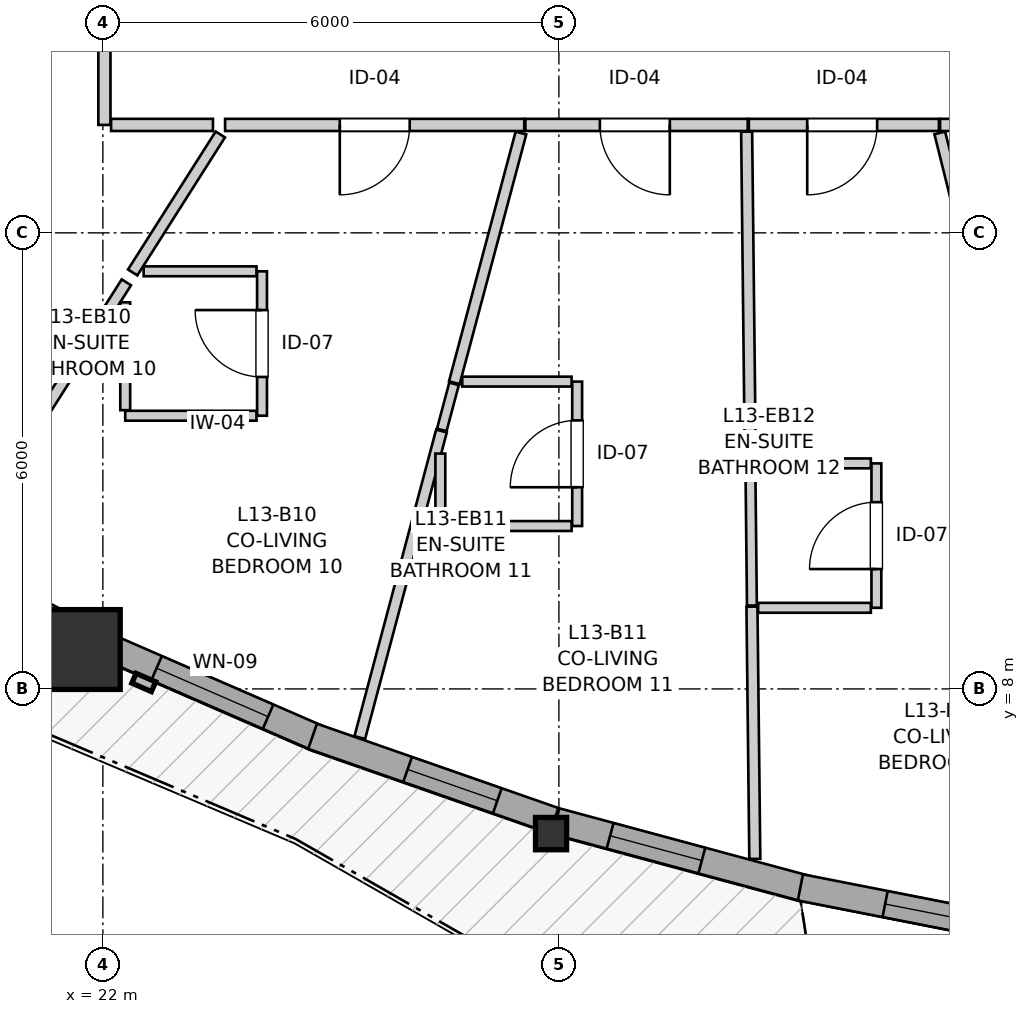
"""IFC4 building model, lengths in metres.
Left out: names, types, materials, properties, quantities, classifications, styles, units other than length and angle.
Written with IfcOpenShell. Run it as: python <this file> out.ifc"""

import sys

from ifc_helpers import new_model, si_unit, direction, frame, frame_2d, origin, origin_2d, place, context, subcontext, project, spatial, rectangle, i_section, extrude, source, transform, mapped, element, fill, save


model = new_model("IFC4")
c1 = context("Model", 3, precision=1e-05, world=origin(), true_north=direction((0.0, 1.0)))
c2 = subcontext(c1, "Body", "Model", "MODEL_VIEW")
j1 = project(units=[si_unit("LENGTHUNIT", "METRE"), si_unit("PLANEANGLEUNIT", "RADIAN")], contexts=[c1])
p1 = place(None, origin())
s1 = spatial("IfcSite", under=j1, at=p1, CompositionType="ELEMENT")
p2 = place(p1, origin())
s2 = spatial("IfcBuilding", under=s1, at=p2, CompositionType="ELEMENT")
p3 = place(p2, frame((0.0, 0.0, 46.2)))
s3 = spatial("IfcBuildingStorey", under=s2, at=p3, CompositionType="ELEMENT", Elevation=46.2)
m1 = source(origin(), c2, "Body", "SweptSolid", [
    extrude(rectangle(XDim=1.05, YDim=1.05, at=origin_2d()), origin(), (0.0, 0.0, 1.0), 2.94),
])
p4 = place(p3, frame((21.703, 8.518, 0.0), z_axis=(0.0, 0.0, 1.0), x_axis=(1.0, 0.0, 0.0)))
e1 = element("IfcColumn", 1, at=p4, inside=s3, PredefinedType="COLUMN", context=c2, shape_type="MappedRepresentation", body=[
    mapped(m1, transform((0.0, 0.0, 0.0), x_axis=(1.0, 0.0, 0.0), y_axis=(0.0, 1.0, 0.0), z_axis=(0.0, 0.0, 1.0), scale=1.0)),
])
m2 = source(origin(), c2, "Body", "SweptSolid", [
    extrude(i_section(OverallWidth=0.409, OverallDepth=0.425, WebThickness=0.03, FlangeThickness=0.048, FilletRadius=0.015, at=origin_2d()), origin(), (0.0, 0.0, 1.0), 2.94),
])
p5 = place(p3, frame((27.896, 6.096, 0.0), z_axis=(0.0, 0.0, 1.0), x_axis=(1.0, 0.0, 0.0)))
e2 = element("IfcColumn", 2, at=p5, inside=s3, PredefinedType="PILASTER", context=c2, shape_type="MappedRepresentation", body=[
    mapped(m2, transform((0.0, 0.0, 0.0), x_axis=(1.0, 0.0, 0.0), y_axis=(0.0, 1.0, 0.0), z_axis=(0.0, 0.0, 1.0), scale=1.0)),
])
p6 = place(p3, frame((18.842, 10.226, 0.0), z_axis=(0.0, 0.0, 1.0), x_axis=(0.884373657766, -0.466779641211, 0.0)))
e3 = element("IfcWall", 3, at=p6, inside=s3, PredefinedType="SOLIDWALL", context=c2, shape_type="SweptSolid", body=[
    extrude(rectangle(XDim=3.028, YDim=0.35, at=frame_2d((1.514, 0.0))), origin(), (0.0, 0.0, 1.0), 2.42),
])
p7 = place(p6, frame((0.384, 0.0, 0.82)))
e4 = element("IfcOpeningElement", 4, at=p7, cuts=e3, PredefinedType="OPENING", context=c2, shape_type="SweptSolid", body=[
    extrude(rectangle(XDim=0.58, YDim=1.35, at=frame_2d((0.29, 0.675))), frame((0.0, 0.185, 0.0), z_axis=(0.0, -1.0, 0.0), x_axis=(1.0, 0.0, 0.0)), (0.0, 0.0, 1.0), 0.37),
])
p8 = place(p6, frame((1.288, 0.0, 0.82)))
e5 = element("IfcOpeningElement", 5, at=p8, cuts=e3, PredefinedType="OPENING", context=c2, shape_type="SweptSolid", body=[
    extrude(rectangle(XDim=1.25, YDim=1.35, at=frame_2d((0.625, 0.675))), frame((0.0, 0.185, 0.0), z_axis=(0.0, -1.0, 0.0), x_axis=(1.0, 0.0, 0.0)), (0.0, 0.0, 1.0), 0.37),
])
p9 = place(p3, frame((22.048, 8.559, 0.0), z_axis=(0.0, 0.0, 1.0), x_axis=(0.9170891658, -0.398682156576, 0.0)))
e6 = element("IfcWall", 6, at=p9, inside=s3, PredefinedType="SOLIDWALL", context=c2, shape_type="SweptSolid", body=[
    extrude(rectangle(XDim=3.047, YDim=0.35, at=frame_2d((1.523, 0.0))), origin(), (0.0, 0.0, 1.0), 2.42),
])
p10 = place(p9, frame((0.719, 0.0, 0.82)))
e7 = element("IfcOpeningElement", 7, at=p10, cuts=e6, PredefinedType="OPENING", context=c2, shape_type="SweptSolid", body=[
    extrude(rectangle(XDim=1.6, YDim=1.35, at=frame_2d((0.8, 0.675))), frame((0.0, 0.185, 0.0), z_axis=(0.0, -1.0, 0.0), x_axis=(1.0, 0.0, 0.0)), (0.0, 0.0, 1.0), 0.37),
])
p11 = place(p3, frame((24.759, 7.377, 0.0), z_axis=(0.0, 0.0, 1.0), x_axis=(0.94414085716, -0.329542170051, 0.0)))
e8 = element("IfcWall", 8, at=p11, inside=s3, PredefinedType="SOLIDWALL", context=c2, shape_type="SweptSolid", body=[
    extrude(rectangle(XDim=3.364, YDim=0.35, at=frame_2d((1.682, 0.0))), origin(), (0.0, 0.0, 1.0), 2.42),
])
p12 = place(p11, frame((1.324, 0.0, 0.82)))
e9 = element("IfcOpeningElement", 9, at=p12, cuts=e8, PredefinedType="OPENING", context=c2, shape_type="SweptSolid", body=[
    extrude(rectangle(XDim=1.25, YDim=1.35, at=frame_2d((0.625, 0.675))), frame((0.0, 0.185, 0.0), z_axis=(0.0, -1.0, 0.0), x_axis=(1.0, 0.0, 0.0)), (0.0, 0.0, 1.0), 0.37),
])
p13 = place(p3, frame((27.961, 6.26, 0.0), z_axis=(0.0, 0.0, 1.0), x_axis=(0.96545566601, -0.260567375106, 0.0)))
e10 = element("IfcWall", 10, at=p13, inside=s3, PredefinedType="SOLIDWALL", context=c2, shape_type="SweptSolid", body=[
    extrude(rectangle(XDim=3.42, YDim=0.35, at=frame_2d((1.71, 0.0))), origin(), (0.0, 0.0, 1.0), 2.42),
])
p14 = place(p13, frame((0.738, 0.0, 0.82)))
e11 = element("IfcOpeningElement", 11, at=p14, cuts=e10, PredefinedType="OPENING", context=c2, shape_type="SweptSolid", body=[
    extrude(rectangle(XDim=1.25, YDim=1.35, at=frame_2d((0.625, 0.675))), frame((0.0, 0.185, 0.0), z_axis=(0.0, -1.0, 0.0), x_axis=(1.0, 0.0, 0.0)), (0.0, 0.0, 1.0), 0.37),
])
p15 = place(p3, frame((31.177, 5.389, 0.0), z_axis=(0.0, 0.0, 1.0), x_axis=(0.981235727687, -0.192811946491, 0.0)))
e12 = element("IfcWall", 12, at=p15, inside=s3, PredefinedType="SOLIDWALL", context=c2, shape_type="SweptSolid", body=[
    extrude(rectangle(XDim=3.212, YDim=0.35, at=frame_2d((1.606, 0.0))), origin(), (0.0, 0.0, 1.0), 2.42),
])
p16 = place(p15, frame((1.136, 0.0, 0.82)))
e13 = element("IfcOpeningElement", 13, at=p16, cuts=e12, PredefinedType="OPENING", context=c2, shape_type="SweptSolid", body=[
    extrude(rectangle(XDim=0.95, YDim=1.35, at=frame_2d((0.475, 0.675))), frame((0.0, 0.185, 0.0), z_axis=(0.0, -1.0, 0.0), x_axis=(1.0, 0.0, 0.0)), (0.0, 0.0, 1.0), 0.37),
])
p17 = place(p3, frame((22.02, 15.42, 0.0), z_axis=(0.0, 0.0, 1.0), x_axis=(0.0, 1.0, 0.0)))
e14 = element("IfcWall", 14, at=p17, inside=s3, PredefinedType="PARTITIONING", context=c2, shape_type="SweptSolid", body=[
    extrude(rectangle(XDim=5.786, YDim=0.16, at=frame_2d((2.893, 0.0))), origin(), (0.0, 0.0, 1.0), 2.94),
])
p18 = place(p17, frame((2.405, 0.0, 0.0)))
e15 = element("IfcOpeningElement", 15, at=p18, cuts=e14, PredefinedType="OPENING", context=c2, shape_type="SweptSolid", body=[
    extrude(rectangle(XDim=0.96, YDim=2.1, at=frame_2d((0.48, 1.05))), frame((0.0, 0.09, 0.0), z_axis=(0.0, -1.0, 0.0), x_axis=(1.0, 0.0, 0.0)), (0.0, 0.0, 1.0), 0.18),
])
p19 = place(p3, frame((27.544, 15.42, 0.0), z_axis=(0.0, 0.0, 1.0), x_axis=(-1.0, 0.0, 0.0)))
e16 = element("IfcWall", 16, at=p19, inside=s3, PredefinedType="PARTITIONING", context=c2, shape_type="SweptSolid", body=[
    extrude(rectangle(XDim=3.936, YDim=0.16, at=frame_2d((1.968, 0.0))), origin(), (0.0, 0.0, 1.0), 2.94),
])
p20 = place(p19, frame((1.507, 0.0, 0.0)))
e17 = element("IfcOpeningElement", 17, at=p20, cuts=e16, PredefinedType="OPENING", context=c2, shape_type="SweptSolid", body=[
    extrude(rectangle(XDim=0.92, YDim=2.1, at=frame_2d((0.46, 1.05))), frame((0.0, 0.09, 0.0), z_axis=(0.0, -1.0, 0.0), x_axis=(1.0, 0.0, 0.0)), (0.0, 0.0, 1.0), 0.18),
])
p21 = place(p3, frame((30.484, 15.42, 0.0), z_axis=(0.0, 0.0, 1.0), x_axis=(-1.0, 0.0, 0.0)))
e18 = element("IfcWall", 18, at=p21, inside=s3, PredefinedType="PARTITIONING", context=c2, shape_type="SweptSolid", body=[
    extrude(rectangle(XDim=2.925, YDim=0.16, at=frame_2d((1.462, 0.0))), origin(), (0.0, 0.0, 1.0), 2.94),
])
p22 = place(p21, frame((1.025, 0.0, 0.0)))
e19 = element("IfcOpeningElement", 19, at=p22, cuts=e18, PredefinedType="OPENING", context=c2, shape_type="SweptSolid", body=[
    extrude(rectangle(XDim=0.92, YDim=2.1, at=frame_2d((0.46, 1.05))), frame((0.0, 0.09, 0.0), z_axis=(0.0, -1.0, 0.0), x_axis=(1.0, 0.0, 0.0)), (0.0, 0.0, 1.0), 0.18),
])
p23 = place(p3, frame((33.0, 15.42, 0.0), z_axis=(0.0, 0.0, 1.0), x_axis=(-1.0, 0.0, 0.0)))
e20 = element("IfcWall", 20, at=p23, inside=s3, PredefinedType="PARTITIONING", context=c2, shape_type="SweptSolid", body=[
    extrude(rectangle(XDim=2.501, YDim=0.16, at=frame_2d((1.25, 0.0))), origin(), (0.0, 0.0, 1.0), 2.94),
])
p24 = place(p23, frame((0.813, 0.0, 0.0)))
e21 = element("IfcOpeningElement", 21, at=p24, cuts=e20, PredefinedType="OPENING", context=c2, shape_type="SweptSolid", body=[
    extrude(rectangle(XDim=0.92, YDim=2.1, at=frame_2d((0.46, 1.05))), frame((0.0, 0.09, 0.0), z_axis=(0.0, -1.0, 0.0), x_axis=(1.0, 0.0, 0.0)), (0.0, 0.0, 1.0), 0.18),
])
p25 = place(p3, frame((24.094, 11.594, 0.0), z_axis=(0.0, 0.0, 1.0), x_axis=(0.0, 1.0, 0.0)))
e22 = element("IfcWall", 22, at=p25, inside=s3, PredefinedType="PARTITIONING", context=c2, shape_type="SweptSolid", body=[
    extrude(rectangle(XDim=1.9, YDim=0.13, at=frame_2d((0.95, 0.0))), origin(), (0.0, 0.0, 1.0), 2.94),
])
p26 = place(p25, frame((0.51, 0.0, 0.0)))
e23 = element("IfcOpeningElement", 23, at=p26, cuts=e22, PredefinedType="OPENING", context=c2, shape_type="SweptSolid", body=[
    extrude(rectangle(XDim=0.88, YDim=2.05, at=frame_2d((0.44, 1.025))), frame((0.0, 0.075, 0.0), z_axis=(0.0, -1.0, 0.0), x_axis=(1.0, 0.0, 0.0)), (0.0, 0.0, 1.0), 0.15),
])
p27 = place(p3, frame((32.177, 9.067, 0.0), z_axis=(0.0, 0.0, 1.0), x_axis=(0.0, 1.0, 0.0)))
e24 = element("IfcWall", 24, at=p27, inside=s3, PredefinedType="PARTITIONING", context=c2, shape_type="SweptSolid", body=[
    extrude(rectangle(XDim=1.9, YDim=0.13, at=frame_2d((0.95, 0.0))), origin(), (0.0, 0.0, 1.0), 2.94),
])
p28 = place(p27, frame((0.51, 0.0, 0.0)))
e25 = element("IfcOpeningElement", 25, at=p28, cuts=e24, PredefinedType="OPENING", context=c2, shape_type="SweptSolid", body=[
    extrude(rectangle(XDim=0.88, YDim=2.05, at=frame_2d((0.44, 1.025))), frame((0.0, 0.075, 0.0), z_axis=(0.0, -1.0, 0.0), x_axis=(1.0, 0.0, 0.0)), (0.0, 0.0, 1.0), 0.15),
])
p29 = place(p3, frame((28.24, 10.143, 0.0), z_axis=(0.0, 0.0, 1.0), x_axis=(0.0, 1.0, 0.0)))
e26 = element("IfcWall", 26, at=p29, inside=s3, PredefinedType="PARTITIONING", context=c2, shape_type="SweptSolid", body=[
    extrude(rectangle(XDim=1.9, YDim=0.13, at=frame_2d((0.95, 0.0))), origin(), (0.0, 0.0, 1.0), 2.94),
])
p30 = place(p29, frame((0.51, 0.0, 0.0)))
e27 = element("IfcOpeningElement", 27, at=p30, cuts=e26, PredefinedType="OPENING", context=c2, shape_type="SweptSolid", body=[
    extrude(rectangle(XDim=0.88, YDim=2.05, at=frame_2d((0.44, 1.025))), frame((0.0, 0.075, 0.0), z_axis=(0.0, -1.0, 0.0), x_axis=(1.0, 0.0, 0.0)), (0.0, 0.0, 1.0), 0.15),
])
p31 = place(p3, frame((34.591, 15.42, 0.0), z_axis=(0.0, 0.0, 1.0), x_axis=(-1.0, 0.0, 0.0)))
e28 = element("IfcWall", 28, at=p31, inside=s3, PredefinedType="PARTITIONING", context=c2, shape_type="SweptSolid", body=[
    extrude(rectangle(XDim=1.576, YDim=0.16, at=frame_2d((0.788, 0.0))), origin(), (0.0, 0.0, 1.0), 2.94),
])
p32 = place(p31, frame((0.327, 0.0, 0.0)))
e29 = element("IfcOpeningElement", 29, at=p32, cuts=e28, PredefinedType="OPENING", context=c2, shape_type="SweptSolid", body=[
    extrude(rectangle(XDim=0.92, YDim=2.1, at=frame_2d((0.46, 1.05))), frame((0.0, 0.09, 0.0), z_axis=(0.0, -1.0, 0.0), x_axis=(1.0, 0.0, 0.0)), (0.0, 0.0, 1.0), 0.18),
])
p33 = place(p3, frame((12.009, 15.406, 0.0), z_axis=(0.0, 0.0, 1.0), x_axis=(0.865925986209, 0.500172156771, 0.0)))
e30 = element("IfcWall", 30, at=p33, inside=s3, PredefinedType="PARTITIONING", context=c2, shape_type="SweptSolid", body=[
    extrude(rectangle(XDim=11.419, YDim=0.145, at=frame_2d((5.709, 0.0))), origin(), (0.0, 0.0, 1.0), 2.94),
])
p34 = place(p3, frame((33.011, 15.315, 0.0), z_axis=(0.0, 0.0, 1.0), x_axis=(0.241616400535, -0.970371843673, 0.0)))
e31 = element("IfcWall", 31, at=p34, inside=s3, PredefinedType="PARTITIONING", context=c2, shape_type="SweptSolid", body=[
    extrude(rectangle(XDim=11.125, YDim=0.145, at=frame_2d((5.562, 0.0))), origin(), (0.0, 0.0, 1.0), 2.94),
])
p35 = place(p3, frame((30.47, 15.331, 0.0), z_axis=(0.0, 0.0, 1.0), x_axis=(0.011204559183, -0.999937226957, 0.0)))
e32 = element("IfcWall", 32, at=p35, inside=s3, PredefinedType="PARTITIONING", context=c2, shape_type="SweptSolid", body=[
    extrude(rectangle(XDim=4.38, YDim=0.145, at=frame_2d((2.19, 0.0))), origin(), (0.0, 0.0, 1.0), 2.94),
])
p36 = place(p3, frame((20.054, 9.8, 0.0), z_axis=(0.0, 0.0, 1.0), x_axis=(0.536345686693, 0.843998403059, 0.0)))
e33 = element("IfcWall", 33, at=p36, inside=s3, PredefinedType="PARTITIONING", context=c2, shape_type="SweptSolid", body=[
    extrude(rectangle(XDim=4.205, YDim=0.145, at=frame_2d((2.103, 0.0))), origin(), (0.0, 0.0, 1.0), 2.94),
])
p37 = place(p3, frame((25.38, 7.36, 0.0), z_axis=(0.0, 0.0, 1.0), x_axis=(0.257575283531, 0.966258233245, 0.0)))
e34 = element("IfcWall", 34, at=p37, inside=s3, PredefinedType="PARTITIONING", context=c2, shape_type="SweptSolid", body=[
    extrude(rectangle(XDim=4.174, YDim=0.145, at=frame_2d((2.087, 0.0))), origin(), (0.0, 0.0, 1.0), 2.94),
])
p38 = place(p3, frame((26.624, 12.028, 0.0), z_axis=(0.0, 0.0, 1.0), x_axis=(0.257743083598, 0.966213487205, 0.0)))
e35 = element("IfcWall", 35, at=p38, inside=s3, PredefinedType="PARTITIONING", context=c2, shape_type="SweptSolid", body=[
    extrude(rectangle(XDim=3.401, YDim=0.145, at=frame_2d((1.7, 0.0))), origin(), (0.0, 0.0, 1.0), 2.94),
])
p39 = place(p3, frame((30.54, 9.082, 0.0), z_axis=(0.0, 0.0, 1.0), x_axis=(0.011329467055, -0.999935819529, 0.0)))
e36 = element("IfcWall", 36, at=p39, inside=s3, PredefinedType="PARTITIONING", context=c2, shape_type="SweptSolid", body=[
    extrude(rectangle(XDim=3.319, YDim=0.145, at=frame_2d((1.659, 0.0))), origin(), (0.0, 0.0, 1.0), 2.94),
])
p40 = place(p3, frame((22.392, 13.479, 0.0), z_axis=(0.0, 0.0, 1.0), x_axis=(0.53614810629, 0.844123929362, 0.0)))
e37 = element("IfcWall", 37, at=p40, inside=s3, PredefinedType="PARTITIONING", context=c2, shape_type="SweptSolid", body=[
    extrude(rectangle(XDim=2.151, YDim=0.145, at=frame_2d((1.075, 0.0))), origin(), (0.0, 0.0, 1.0), 2.94),
])
p41 = place(p3, frame((30.52, 10.937, 0.0), z_axis=(0.0, 0.0, 1.0), x_axis=(0.010879016503, -0.999940821749, 0.0)))
e38 = element("IfcWall", 38, at=p41, inside=s3, PredefinedType="PARTITIONING", context=c2, shape_type="SweptSolid", body=[
    extrude(rectangle(XDim=1.84, YDim=0.13, at=frame_2d((0.92, 0.0))), origin(), (0.0, 0.0, 1.0), 2.94),
])
p42 = place(p3, frame((22.294, 11.594, 0.0), z_axis=(0.0, 0.0, 1.0), x_axis=(1.0, 0.0, 0.0)))
e39 = element("IfcWall", 39, at=p42, inside=s3, PredefinedType="PARTITIONING", context=c2, shape_type="SweptSolid", body=[
    extrude(rectangle(XDim=1.727, YDim=0.13, at=frame_2d((0.864, 0.0))), origin(), (0.0, 0.0, 1.0), 2.94),
])
p43 = place(p3, frame((26.44, 10.143, 0.0), z_axis=(0.0, 0.0, 1.0), x_axis=(1.0, 0.0, 0.0)))
e40 = element("IfcWall", 40, at=p43, inside=s3, PredefinedType="PARTITIONING", context=c2, shape_type="SweptSolid", body=[
    extrude(rectangle(XDim=1.727, YDim=0.13, at=frame_2d((0.864, 0.0))), origin(), (0.0, 0.0, 1.0), 2.508),
])
p44 = place(p3, frame((22.294, 11.667, 0.0), z_axis=(0.0, 0.0, 1.0), x_axis=(0.0, 1.0, 0.0)))
e41 = element("IfcWall", 41, at=p44, inside=s3, PredefinedType="PARTITIONING", context=c2, shape_type="SweptSolid", body=[
    extrude(rectangle(XDim=1.419, YDim=0.13, at=frame_2d((0.709, 0.0))), origin(), (0.0, 0.0, 1.0), 2.94),
])
p45 = place(p3, frame((22.536, 13.494, 0.0), z_axis=(0.0, 0.0, 1.0), x_axis=(1.0, 0.0, 0.0)))
e42 = element("IfcWall", 42, at=p45, inside=s3, PredefinedType="PARTITIONING", context=c2, shape_type="SweptSolid", body=[
    extrude(rectangle(XDim=1.485, YDim=0.13, at=frame_2d((0.742, 0.0))), origin(), (0.0, 0.0, 1.0), 2.94),
])
p46 = place(p3, frame((30.6, 10.967, 0.0), z_axis=(0.0, 0.0, 1.0), x_axis=(1.0, 0.0, 0.0)))
e43 = element("IfcWall", 43, at=p46, inside=s3, PredefinedType="PARTITIONING", context=c2, shape_type="SweptSolid", body=[
    extrude(rectangle(XDim=1.504, YDim=0.13, at=frame_2d((0.752, 0.0))), origin(), (0.0, 0.0, 1.0), 2.94),
])
p47 = place(p3, frame((30.621, 9.067, 0.0), z_axis=(0.0, 0.0, 1.0), x_axis=(1.0, 0.0, 0.0)))
e44 = element("IfcWall", 44, at=p47, inside=s3, PredefinedType="PARTITIONING", context=c2, shape_type="SweptSolid", body=[
    extrude(rectangle(XDim=1.483, YDim=0.13, at=frame_2d((0.741, 0.0))), origin(), (0.0, 0.0, 1.0), 2.508),
])
p48 = place(p3, frame((26.729, 12.043, 0.0), z_axis=(0.0, 0.0, 1.0), x_axis=(1.0, 0.0, 0.0)))
e45 = element("IfcWall", 45, at=p48, inside=s3, PredefinedType="PARTITIONING", context=c2, shape_type="SweptSolid", body=[
    extrude(rectangle(XDim=1.438, YDim=0.13, at=frame_2d((0.719, 0.0))), origin(), (0.0, 0.0, 1.0), 2.94),
])
p49 = place(p3, frame((22.108, 15.42, 0.0), z_axis=(0.0, 0.0, 1.0), x_axis=(1.0, 0.0, 0.0)))
e46 = element("IfcWall", 46, at=p49, inside=s3, PredefinedType="PARTITIONING", context=c2, shape_type="SweptSolid", body=[
    extrude(rectangle(XDim=1.34, YDim=0.16, at=frame_2d((0.67, 0.0))), origin(), (0.0, 0.0, 1.0), 2.94),
])
p50 = place(p3, frame((26.44, 10.216, 0.0), z_axis=(0.0, 0.0, 1.0), x_axis=(0.0, 1.0, 0.0)))
e47 = element("IfcWall", 47, at=p50, inside=s3, PredefinedType="PARTITIONING", context=c2, shape_type="SweptSolid", body=[
    extrude(rectangle(XDim=0.88, YDim=0.13, at=frame_2d((0.44, 0.0))), origin(), (0.0, 0.0, 1.0), 2.94),
])
p51 = place(p3, frame((26.459, 11.407, 0.0), z_axis=(0.0, 0.0, 1.0), x_axis=(0.256984017378, 0.966415653232, 0.0)))
e48 = element("IfcWall", 48, at=p51, inside=s3, PredefinedType="PARTITIONING", context=c2, shape_type="SweptSolid", body=[
    extrude(rectangle(XDim=0.627, YDim=0.13, at=frame_2d((0.313, 0.0))), origin(), (0.0, 0.0, 1.0), 2.94),
])
m3 = source(origin(), c2, "Body", "SweptSolid", [
    extrude(rectangle(XDim=1.6, YDim=1.35, at=frame_2d((0.8, 0.675))), frame((0.0, 0.03, 0.0), z_axis=(0.0, -1.0, 0.0), x_axis=(1.0, 0.0, 0.0)), (0.0, 0.0, 1.0), 0.06),
])
p52 = place(p10, origin())
e49 = element("IfcWindow", 49, at=p52, inside=s3, PartitioningType="SINGLE_PANEL", PredefinedType="WINDOW", context=c2, shape_type="MappedRepresentation", body=[
    mapped(m3, transform((0.0, 0.0, 0.0), x_axis=(1.0, 0.0, 0.0), y_axis=(0.0, 1.0, 0.0), z_axis=(0.0, 0.0, 1.0), scale=1.0)),
])
fill(e7, e49)
m4 = source(origin(), c2, "Body", "SweptSolid", [
    extrude(rectangle(XDim=1.25, YDim=1.35, at=frame_2d((0.625, 0.675))), frame((0.0, 0.03, 0.0), z_axis=(0.0, -1.0, 0.0), x_axis=(1.0, 0.0, 0.0)), (0.0, 0.0, 1.0), 0.06),
])
p53 = place(p12, origin())
e50 = element("IfcWindow", 50, at=p53, inside=s3, PartitioningType="SINGLE_PANEL", PredefinedType="WINDOW", context=c2, shape_type="MappedRepresentation", body=[
    mapped(m4, transform((0.0, 0.0, 0.0), x_axis=(1.0, 0.0, 0.0), y_axis=(0.0, 1.0, 0.0), z_axis=(0.0, 0.0, 1.0), scale=1.0)),
])
fill(e9, e50)
p54 = place(p14, origin())
e51 = element("IfcWindow", 51, at=p54, inside=s3, PartitioningType="SINGLE_PANEL", PredefinedType="WINDOW", context=c2, shape_type="MappedRepresentation", body=[
    mapped(m4, transform((0.0, 0.0, 0.0), x_axis=(1.0, 0.0, 0.0), y_axis=(0.0, 1.0, 0.0), z_axis=(0.0, 0.0, 1.0), scale=1.0)),
])
fill(e11, e51)
m5 = source(origin(), c2, "Body", "SweptSolid", [
    extrude(rectangle(XDim=0.95, YDim=1.35, at=frame_2d((0.475, 0.675))), frame((0.0, 0.03, 0.0), z_axis=(0.0, -1.0, 0.0), x_axis=(1.0, 0.0, 0.0)), (0.0, 0.0, 1.0), 0.06),
])
p55 = place(p16, origin())
e52 = element("IfcWindow", 52, at=p55, inside=s3, PartitioningType="SINGLE_PANEL", PredefinedType="WINDOW", context=c2, shape_type="MappedRepresentation", body=[
    mapped(m5, transform((0.0, 0.0, 0.0), x_axis=(1.0, 0.0, 0.0), y_axis=(0.0, 1.0, 0.0), z_axis=(0.0, 0.0, 1.0), scale=1.0)),
])
fill(e13, e52)
m6 = source(origin(), c2, "Body", "SweptSolid", [
    extrude(rectangle(XDim=0.92, YDim=2.1, at=frame_2d((0.46, 1.05))), frame((0.0, 0.025, 0.0), z_axis=(0.0, -1.0, 0.0), x_axis=(1.0, 0.0, 0.0)), (0.0, 0.0, 1.0), 0.05),
])
p56 = place(p20, origin())
e53 = element("IfcDoor", 53, at=p56, inside=s3, OperationType="SINGLE_SWING_RIGHT", PredefinedType="DOOR", context=c2, shape_type="MappedRepresentation", body=[
    mapped(m6, transform((0.0, 0.0, 0.0), x_axis=(1.0, 0.0, 0.0), y_axis=(0.0, 1.0, 0.0), z_axis=(0.0, 0.0, 1.0), scale=1.0)),
])
fill(e17, e53)
p57 = place(p22, origin())
e54 = element("IfcDoor", 54, at=p57, inside=s3, OperationType="SINGLE_SWING_LEFT", PredefinedType="DOOR", context=c2, shape_type="MappedRepresentation", body=[
    mapped(m6, transform((0.0, 0.0, 0.0), x_axis=(1.0, 0.0, 0.0), y_axis=(0.0, 1.0, 0.0), z_axis=(0.0, 0.0, 1.0), scale=1.0)),
])
fill(e19, e54)
p58 = place(p24, origin())
e55 = element("IfcDoor", 55, at=p58, inside=s3, OperationType="SINGLE_SWING_RIGHT", PredefinedType="DOOR", context=c2, shape_type="MappedRepresentation", body=[
    mapped(m6, transform((0.0, 0.0, 0.0), x_axis=(1.0, 0.0, 0.0), y_axis=(0.0, 1.0, 0.0), z_axis=(0.0, 0.0, 1.0), scale=1.0)),
])
fill(e21, e55)
m7 = source(origin(), c2, "Body", "SweptSolid", [
    extrude(rectangle(XDim=0.88, YDim=2.05, at=frame_2d((0.44, 1.025))), frame((0.0, 0.025, 0.0), z_axis=(0.0, -1.0, 0.0), x_axis=(1.0, 0.0, 0.0)), (0.0, 0.0, 1.0), 0.05),
])
p59 = place(p26, origin())
e56 = element("IfcDoor", 56, at=p59, inside=s3, OperationType="SINGLE_SWING_RIGHT", PredefinedType="DOOR", context=c2, shape_type="MappedRepresentation", body=[
    mapped(m7, transform((0.0, 0.0, 0.0), x_axis=(1.0, 0.0, 0.0), y_axis=(0.0, 1.0, 0.0), z_axis=(0.0, 0.0, 1.0), scale=1.0)),
])
fill(e23, e56)
p60 = place(p28, origin())
e57 = element("IfcDoor", 57, at=p60, inside=s3, OperationType="SINGLE_SWING_LEFT", PredefinedType="DOOR", context=c2, shape_type="MappedRepresentation", body=[
    mapped(m7, transform((0.0, 0.0, 0.0), x_axis=(1.0, 0.0, 0.0), y_axis=(0.0, 1.0, 0.0), z_axis=(0.0, 0.0, 1.0), scale=1.0)),
])
fill(e25, e57)
p61 = place(p30, origin())
e58 = element("IfcDoor", 58, at=p61, inside=s3, OperationType="SINGLE_SWING_LEFT", PredefinedType="DOOR", context=c2, shape_type="MappedRepresentation", body=[
    mapped(m7, transform((0.0, 0.0, 0.0), x_axis=(1.0, 0.0, 0.0), y_axis=(0.0, 1.0, 0.0), z_axis=(0.0, 0.0, 1.0), scale=1.0)),
])
fill(e27, e58)
save(model, sys.argv[1])
